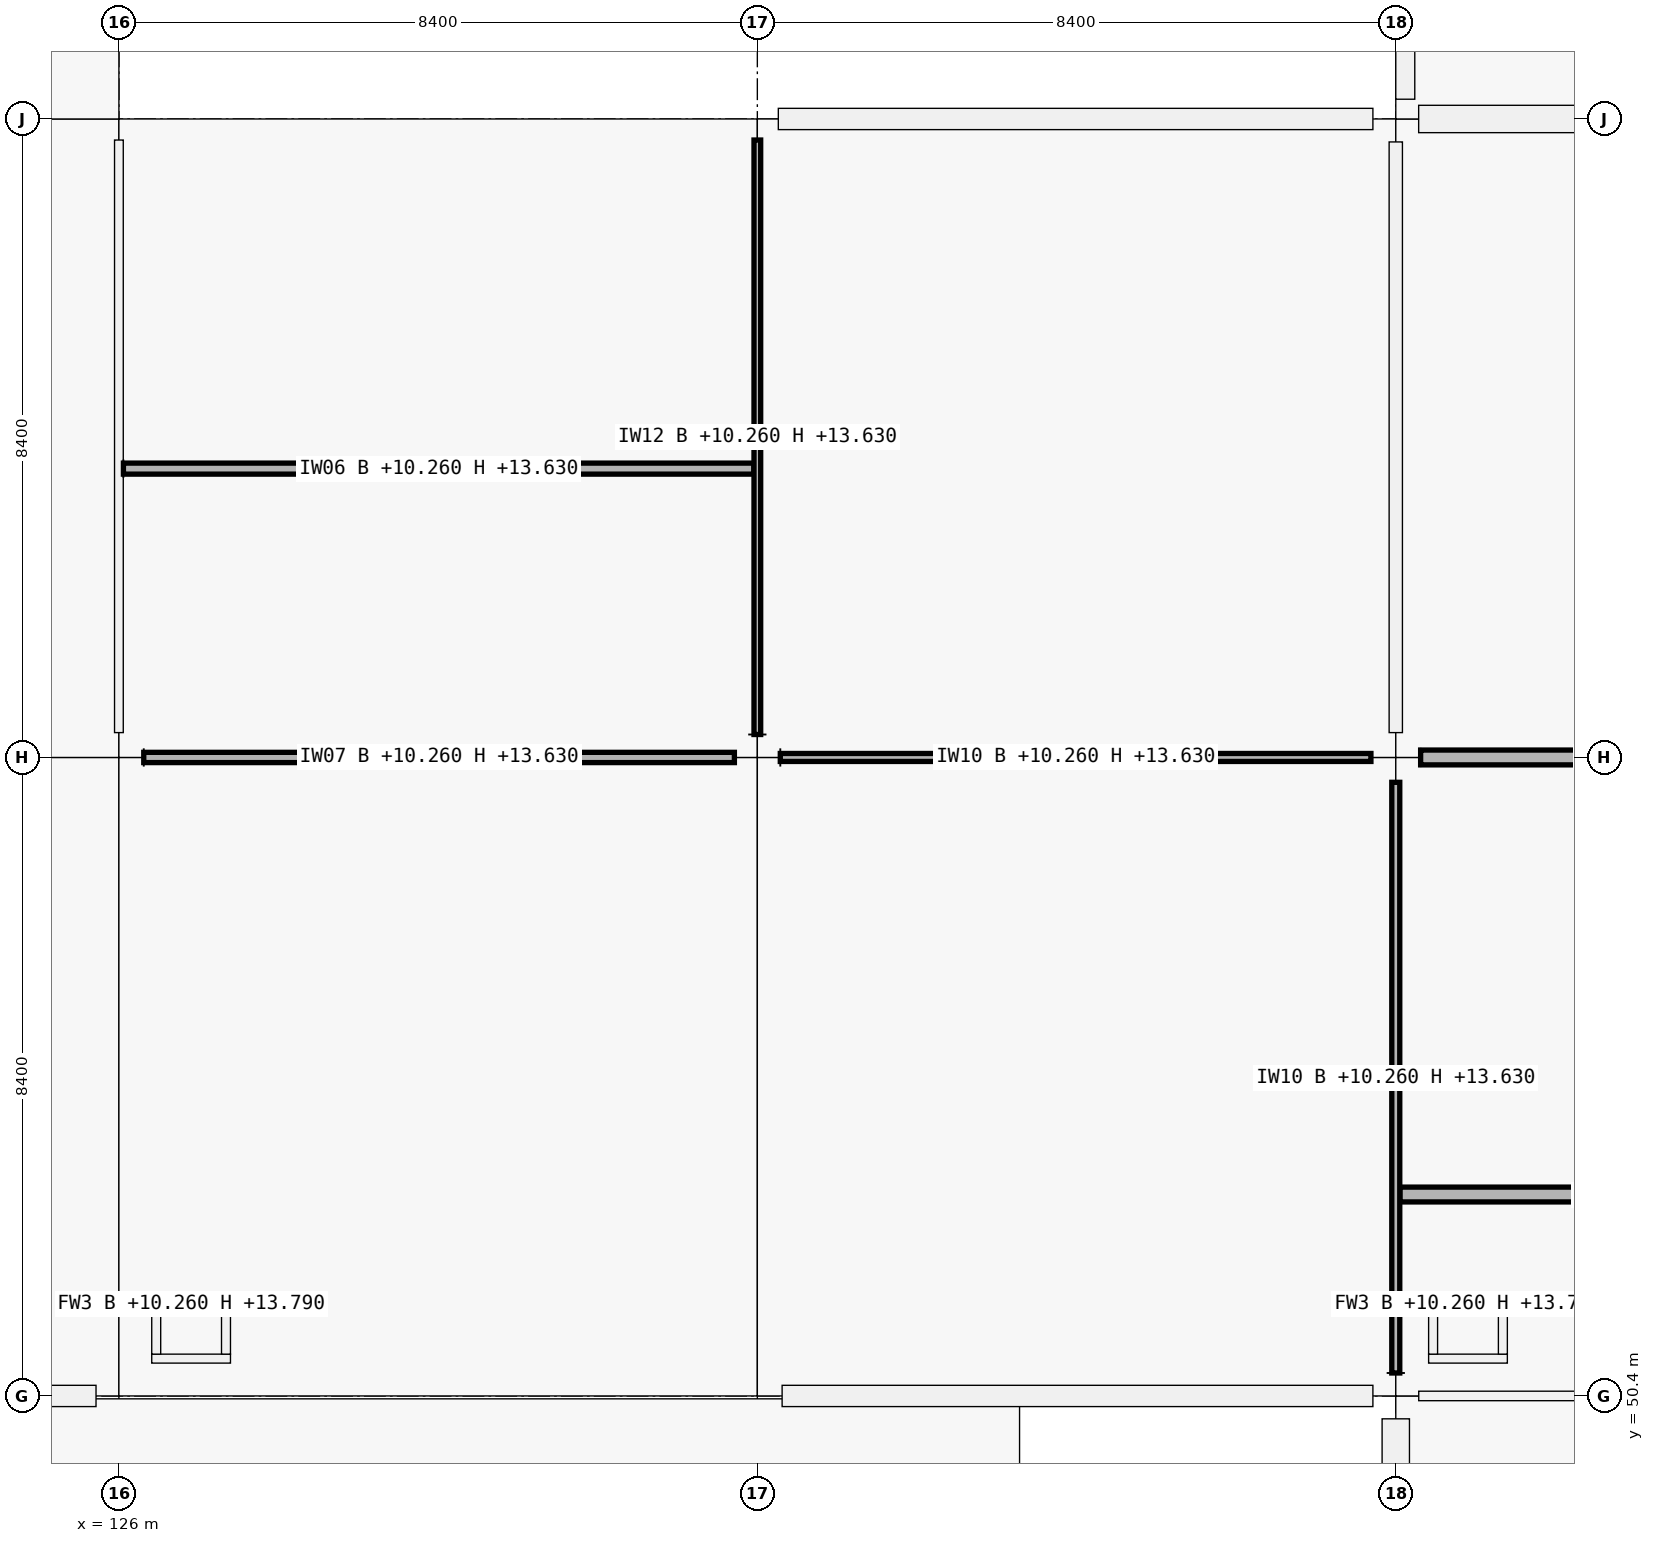
"""IFC4 building model, lengths in metres.
Left out: names, types, materials, properties, quantities, classifications, styles, units other than length and angle.
Written with IfcOpenShell. Run it as: python <this file> out.ifc"""

import sys

from ifc_helpers import new_model, si_unit, direction, frame, frame_2d, origin, origin_2d, place, context, subcontext, project, spatial, rectangle, extrude, element, fill, save


model = new_model("IFC4")
c1 = context("Model", 3, precision=1e-05, world=origin(), true_north=direction((0.0, 1.0)))
c2 = subcontext(c1, "Body", "Model", "MODEL_VIEW")
j1 = project(units=[si_unit("LENGTHUNIT", "METRE"), si_unit("PLANEANGLEUNIT", "RADIAN")], contexts=[c1])
p1 = place(None, origin())
s1 = spatial("IfcSite", under=j1, at=p1, CompositionType="ELEMENT")
p2 = place(p1, origin())
s2 = spatial("IfcBuilding", under=s1, at=p2, CompositionType="ELEMENT")
p3 = place(p2, frame((0.0, 0.0, 10.26)))
s3 = spatial("IfcBuildingStorey", under=s2, at=p3, CompositionType="ELEMENT", Elevation=10.26)
p4 = place(p3, frame((126.0, 50.4, 0.0), z_axis=(0.0, 0.0, 1.0), x_axis=(1.0, 0.0, 0.0)))
e1 = element("IfcColumn", 1, at=p4, inside=s3, PredefinedType="COLUMN", context=c2, shape_type="SweptSolid", body=[
    extrude(rectangle(XDim=0.6, YDim=0.6, at=origin_2d()), origin(), (0.0, 0.0, 1.0), 4.5),
])
p5 = place(p3, frame((126.0, 58.8, 0.0), z_axis=(0.0, 0.0, 1.0), x_axis=(1.0, 0.0, 0.0)))
e2 = element("IfcColumn", 2, at=p5, inside=s3, PredefinedType="COLUMN", context=c2, shape_type="SweptSolid", body=[
    extrude(rectangle(XDim=0.65, YDim=0.65, at=origin_2d()), origin(), (0.0, 0.0, 1.0), 4.5),
])
p6 = place(p3, frame((126.0, 67.2, 0.0), z_axis=(0.0, 0.0, 1.0), x_axis=(1.0, 0.0, 0.0)))
e3 = element("IfcColumn", 3, at=p6, inside=s3, PredefinedType="COLUMN", context=c2, shape_type="SweptSolid", body=[
    extrude(rectangle(XDim=0.55, YDim=0.55, at=origin_2d()), origin(), (0.0, 0.0, 1.0), 4.25),
])
p7 = place(p3, frame((134.4, 50.4, 0.0), z_axis=(0.0, 0.0, 1.0), x_axis=(1.0, 0.0, 0.0)))
e4 = element("IfcColumn", 4, at=p7, inside=s3, PredefinedType="COLUMN", context=c2, shape_type="SweptSolid", body=[
    extrude(rectangle(XDim=0.65, YDim=0.65, at=origin_2d()), origin(), (0.0, 0.0, 1.0), 4.5),
])
p8 = place(p3, frame((134.4, 58.8, 0.0), z_axis=(0.0, 0.0, 1.0), x_axis=(1.0, 0.0, 0.0)))
e5 = element("IfcColumn", 5, at=p8, inside=s3, PredefinedType="COLUMN", context=c2, shape_type="SweptSolid", body=[
    extrude(rectangle(XDim=0.6, YDim=0.6, at=origin_2d()), origin(), (0.0, 0.0, 1.0), 4.5),
])
p9 = place(p3, frame((134.4, 67.2, 0.0), z_axis=(0.0, 0.0, 1.0), x_axis=(1.0, 0.0, 0.0)))
e6 = element("IfcColumn", 6, at=p9, inside=s3, PredefinedType="COLUMN", context=c2, shape_type="SweptSolid", body=[
    extrude(rectangle(XDim=0.55, YDim=0.55, at=origin_2d()), origin(), (0.0, 0.0, 1.0), 4.25),
])
p10 = place(p3, frame((142.8, 50.4, 0.0), z_axis=(0.0, 0.0, 1.0), x_axis=(1.0, 0.0, 0.0)))
e7 = element("IfcColumn", 7, at=p10, inside=s3, PredefinedType="COLUMN", context=c2, shape_type="SweptSolid", body=[
    extrude(rectangle(XDim=0.6, YDim=0.6, at=origin_2d()), origin(), (0.0, 0.0, 1.0), 4.5),
])
p11 = place(p3, frame((142.8, 58.8, 0.0), z_axis=(0.0, 0.0, 1.0), x_axis=(1.0, 0.0, 0.0)))
e8 = element("IfcColumn", 8, at=p11, inside=s3, PredefinedType="COLUMN", context=c2, shape_type="SweptSolid", body=[
    extrude(rectangle(XDim=0.65, YDim=0.65, at=origin_2d()), origin(), (0.0, 0.0, 1.0), 4.5),
])
p12 = place(p3, frame((142.8, 67.2, 0.0), z_axis=(0.0, 0.0, 1.0), x_axis=(1.0, 0.0, 0.0)))
e9 = element("IfcColumn", 9, at=p12, inside=s3, PredefinedType="COLUMN", context=c2, shape_type="SweptSolid", body=[
    extrude(rectangle(XDim=0.6, YDim=0.6, at=origin_2d()), origin(), (0.0, 0.0, 1.0), 4.5),
])
p13 = place(p3, frame((125.699, 50.4, 0.0), z_axis=(0.0, 0.0, 1.0), x_axis=(-1.0, 0.0, 0.0)))
e10 = element("IfcWall", 10, at=p13, inside=s3, PredefinedType="SOLIDWALL", context=c2, shape_type="SweptSolid", body=[
    extrude(rectangle(XDim=7.773, YDim=0.28, at=frame_2d((3.886, 0.0))), origin(), (0.0, 0.0, 1.0), 3.54),
])
p14 = place(p13, frame((2.611, 0.0, 0.9)))
e11 = element("IfcOpeningElement", 11, at=p14, cuts=e10, PredefinedType="OPENING", context=c2, shape_type="SweptSolid", body=[
    extrude(rectangle(XDim=2.55, YDim=1.95, at=frame_2d((1.275, 0.975))), frame((0.0, 0.14, 0.0), z_axis=(0.0, -1.0, 0.0), x_axis=(1.0, 0.0, 0.0)), (0.0, 0.0, 1.0), 0.28),
])
p15 = place(p3, frame((142.499, 50.4, 0.0), z_axis=(0.0, 0.0, 1.0), x_axis=(-1.0, 0.0, 0.0)))
e12 = element("IfcWall", 12, at=p15, inside=s3, PredefinedType="SOLIDWALL", context=c2, shape_type="SweptSolid", body=[
    extrude(rectangle(XDim=7.773, YDim=0.28, at=frame_2d((3.886, 0.0))), origin(), (0.0, 0.0, 1.0), 3.54),
])
p16 = place(p15, frame((2.911, 0.0, 0.9)))
e13 = element("IfcOpeningElement", 13, at=p16, cuts=e12, PredefinedType="OPENING", context=c2, shape_type="SweptSolid", body=[
    extrude(rectangle(XDim=1.95, YDim=1.6, at=frame_2d((0.975, 0.8))), frame((0.0, 0.14, 0.0), z_axis=(0.0, -1.0, 0.0), x_axis=(1.0, 0.0, 0.0)), (0.0, 0.0, 1.0), 0.28),
])
p17 = place(p3, frame((134.676, 67.2, 0.0), z_axis=(0.0, 0.0, 1.0), x_axis=(1.0, 0.0, 0.0)))
e14 = element("IfcWall", 14, at=p17, inside=s3, PredefinedType="SOLIDWALL", context=c2, shape_type="SweptSolid", body=[
    extrude(rectangle(XDim=7.823, YDim=0.28, at=frame_2d((3.912, 0.0))), origin(), (0.0, 0.0, 1.0), 3.54),
])
p18 = place(p17, frame((2.737, 0.0, 0.9)))
e15 = element("IfcOpeningElement", 15, at=p18, cuts=e14, PredefinedType="OPENING", context=c2, shape_type="SweptSolid", body=[
    extrude(rectangle(XDim=2.35, YDim=1.6, at=frame_2d((1.175, 0.8))), frame((0.0, 0.14, 0.0), z_axis=(0.0, -1.0, 0.0), x_axis=(1.0, 0.0, 0.0)), (0.0, 0.0, 1.0), 0.28),
])
p19 = place(p3, frame((142.8, 42.326, 0.0), z_axis=(0.0, 0.0, 1.0), x_axis=(0.0, 1.0, 0.0)))
e16 = element("IfcWall", 16, at=p19, inside=s3, PredefinedType="SOLIDWALL", context=c2, shape_type="SweptSolid", body=[
    extrude(rectangle(XDim=7.773, YDim=0.36, at=frame_2d((3.887, 0.0))), origin(), (0.0, 0.0, 1.0), 3.54),
])
p20 = place(p19, frame((2.837, 0.0, 0.9)))
e17 = element("IfcOpeningElement", 17, at=p20, cuts=e16, PredefinedType="OPENING", context=c2, shape_type="SweptSolid", body=[
    extrude(rectangle(XDim=2.1, YDim=1.8, at=frame_2d((1.05, 0.9))), frame((0.0, 0.18, 0.0), z_axis=(0.0, -1.0, 0.0), x_axis=(1.0, 0.0, 0.0)), (0.0, 0.0, 1.0), 0.36),
])
p21 = place(p3, frame((143.101, 67.2, 0.0), z_axis=(0.0, 0.0, 1.0), x_axis=(1.0, 0.0, 0.0)))
e18 = element("IfcWall", 18, at=p21, inside=s3, PredefinedType="SOLIDWALL", context=c2, shape_type="SweptSolid", body=[
    extrude(rectangle(XDim=7.773, YDim=0.36, at=frame_2d((3.886, 0.0))), origin(), (0.0, 0.0, 1.0), 3.54),
])
p22 = place(p21, frame((2.686, 0.0, 0.9)))
e19 = element("IfcOpeningElement", 19, at=p22, cuts=e18, PredefinedType="OPENING", context=c2, shape_type="SweptSolid", body=[
    extrude(rectangle(XDim=2.4, YDim=1.8, at=frame_2d((1.2, 0.9))), frame((0.0, 0.18, 0.0), z_axis=(0.0, -1.0, 0.0), x_axis=(1.0, 0.0, 0.0)), (0.0, 0.0, 1.0), 0.36),
])
p23 = place(p3, frame((142.925, 67.46, 0.0), z_axis=(0.0, 0.0, 1.0), x_axis=(0.0, 1.0, 0.0)))
e20 = element("IfcWall", 20, at=p23, inside=s3, PredefinedType="PARAPET", context=c2, shape_type="SweptSolid", body=[
    extrude(rectangle(XDim=7.88, YDim=0.25, at=frame_2d((3.94, 0.0))), origin(), (0.0, 0.0, 1.0), 0.95),
])
for number, where, z_axis, x_axis in (
    (21, (126.432, 50.891, 0.0), (0.0, 0.0, 1.0), (1.0, 0.0, 0.0)),
    (22, (126.432, 51.609, 0.0), (0.0, 0.0, 1.0), (1.0, 0.0, 0.0)),
):
    element("IfcWall", number, at=place(p3, frame(where, z_axis=z_axis, x_axis=x_axis)), inside=s3, PredefinedType="PARTITIONING", context=c2, shape_type="SweptSolid", body=[
        extrude(rectangle(XDim=1.036, YDim=0.118, at=frame_2d((0.518, 0.0))), origin(), (0.0, 0.0, 1.0), 3.53),
    ])
for number, where, z_axis, x_axis in (
    (23, (126.491, 50.95, 0.0), (0.0, 0.0, 1.0), (0.0, 1.0, 0.0)),
    (24, (127.409, 50.95, 0.0), (0.0, 0.0, 1.0), (0.0, 1.0, 0.0)),
):
    element("IfcWall", number, at=place(p3, frame(where, z_axis=z_axis, x_axis=x_axis)), inside=s3, PredefinedType="PARTITIONING", context=c2, shape_type="SweptSolid", body=[
        extrude(rectangle(XDim=0.6, YDim=0.118, at=frame_2d((0.3, 0.0))), origin(), (0.0, 0.0, 1.0), 3.53),
    ])
for number, where, z_axis, x_axis in (
    (25, (143.232, 50.891, 0.0), (0.0, 0.0, 1.0), (1.0, 0.0, 0.0)),
    (26, (143.232, 51.609, 0.0), (0.0, 0.0, 1.0), (1.0, 0.0, 0.0)),
):
    element("IfcWall", number, at=place(p3, frame(where, z_axis=z_axis, x_axis=x_axis)), inside=s3, PredefinedType="PARTITIONING", context=c2, shape_type="SweptSolid", body=[
        extrude(rectangle(XDim=1.036, YDim=0.118, at=frame_2d((0.518, 0.0))), origin(), (0.0, 0.0, 1.0), 3.53),
    ])
for number, where, z_axis, x_axis in (
    (27, (143.291, 50.95, 0.0), (0.0, 0.0, 1.0), (0.0, 1.0, 0.0)),
    (28, (144.209, 50.95, 0.0), (0.0, 0.0, 1.0), (0.0, 1.0, 0.0)),
):
    element("IfcWall", number, at=place(p3, frame(where, z_axis=z_axis, x_axis=x_axis)), inside=s3, PredefinedType="PARTITIONING", context=c2, shape_type="SweptSolid", body=[
        extrude(rectangle(XDim=0.6, YDim=0.118, at=frame_2d((0.3, 0.0))), origin(), (0.0, 0.0, 1.0), 3.53),
    ])
p24 = place(p3, frame((126.327, 58.8, 0.0), z_axis=(0.0, 0.0, 1.0), x_axis=(1.0, 0.0, 0.0)))
e29 = element("IfcWall", 29, at=p24, inside=s3, PredefinedType="PARTITIONING", context=c2, shape_type="SweptSolid", body=[
    extrude(rectangle(XDim=7.771, YDim=0.135, at=frame_2d((3.885, 0.0))), origin(), (0.0, 0.0, 1.0), 3.37),
])
p25 = place(p3, frame((134.702, 58.8, 0.0), z_axis=(0.0, 0.0, 1.0), x_axis=(1.0, 0.0, 0.0)))
e30 = element("IfcWall", 30, at=p25, inside=s3, PredefinedType="PARTITIONING", context=c2, shape_type="SweptSolid", body=[
    extrude(rectangle(XDim=7.771, YDim=0.105, at=frame_2d((3.885, 0.0))), origin(), (0.0, 0.0, 1.0), 3.37),
])
p26 = place(p25, frame((3.415, 0.0, 0.0)))
e31 = element("IfcOpeningElement", 31, at=p26, cuts=e30, PredefinedType="OPENING", context=c2, shape_type="SweptSolid", body=[
    extrude(rectangle(XDim=0.94, YDim=2.15, at=frame_2d((0.47, 1.075))), frame((0.0, 0.052, 0.0), z_axis=(0.0, -1.0, 0.0), x_axis=(1.0, 0.0, 0.0)), (0.0, 0.0, 1.0), 0.105),
])
p27 = place(p3, frame((143.102, 50.4, 0.0), z_axis=(0.0, 0.0, 1.0), x_axis=(1.0, 0.0, 0.0)))
e32 = element("IfcWall", 32, at=p27, inside=s3, PredefinedType="PARTITIONING", context=c2, shape_type="SweptSolid", body=[
    extrude(rectangle(XDim=7.771, YDim=0.125, at=frame_2d((3.885, 0.0))), origin(), (0.0, 0.0, 1.0), 3.37),
])
p28 = place(p3, frame((143.127, 58.8, 0.0), z_axis=(0.0, 0.0, 1.0), x_axis=(1.0, 0.0, 0.0)))
e33 = element("IfcWall", 33, at=p28, inside=s3, PredefinedType="PARTITIONING", context=c2, shape_type="SweptSolid", body=[
    extrude(rectangle(XDim=7.771, YDim=0.195, at=frame_2d((3.885, 0.0))), origin(), (0.0, 0.0, 1.0), 3.37),
])
p29 = place(p3, frame((126.0, 59.127, 0.0), z_axis=(0.0, 0.0, 1.0), x_axis=(0.0, 1.0, 0.0)))
e34 = element("IfcWall", 34, at=p29, inside=s3, PredefinedType="PARTITIONING", context=c2, shape_type="SweptSolid", body=[
    extrude(rectangle(XDim=7.796, YDim=0.115, at=frame_2d((3.898, 0.0))), origin(), (0.0, 0.0, 1.0), 3.37),
])
p30 = place(p29, frame((1.253, 0.0, 0.0)))
e35 = element("IfcOpeningElement", 35, at=p30, cuts=e34, PredefinedType="OPENING", context=c2, shape_type="SweptSolid", body=[
    extrude(rectangle(XDim=0.92, YDim=2.15, at=frame_2d((0.46, 1.075))), frame((0.0, 0.058, 0.0), z_axis=(0.0, -1.0, 0.0), x_axis=(1.0, 0.0, 0.0)), (0.0, 0.0, 1.0), 0.115),
])
p31 = place(p29, frame((5.108, 0.0, 0.0)))
e36 = element("IfcOpeningElement", 36, at=p31, cuts=e34, PredefinedType="OPENING", context=c2, shape_type="SweptSolid", body=[
    extrude(rectangle(XDim=1.05, YDim=2.12, at=frame_2d((0.525, 1.06))), frame((0.0, 0.058, 0.0), z_axis=(0.0, -1.0, 0.0), x_axis=(1.0, 0.0, 0.0)), (0.0, 0.0, 1.0), 0.115),
])
p32 = place(p3, frame((134.4, 59.102, 0.0), z_axis=(0.0, 0.0, 1.0), x_axis=(0.0, 1.0, 0.0)))
e37 = element("IfcWall", 37, at=p32, inside=s3, PredefinedType="PARTITIONING", context=c2, shape_type="SweptSolid", body=[
    extrude(rectangle(XDim=7.821, YDim=0.088, at=frame_2d((3.911, 0.0))), origin(), (0.0, 0.0, 1.0), 3.37),
])
p33 = place(p3, frame((142.8, 50.702, 0.0), z_axis=(0.0, 0.0, 1.0), x_axis=(0.0, 1.0, 0.0)))
e38 = element("IfcWall", 38, at=p33, inside=s3, PredefinedType="PARTITIONING", context=c2, shape_type="SweptSolid", body=[
    extrude(rectangle(XDim=7.771, YDim=0.105, at=frame_2d((3.885, 0.0))), origin(), (0.0, 0.0, 1.0), 3.37),
])
p34 = place(p33, frame((0.673, 0.0, 0.0)))
e39 = element("IfcOpeningElement", 39, at=p34, cuts=e38, PredefinedType="OPENING", context=c2, shape_type="SweptSolid", body=[
    extrude(rectangle(XDim=0.98, YDim=2.08, at=frame_2d((0.49, 1.04))), frame((0.0, 0.052, 0.0), z_axis=(0.0, -1.0, 0.0), x_axis=(1.0, 0.0, 0.0)), (0.0, 0.0, 1.0), 0.105),
])
p35 = place(p33, frame((4.613, 0.0, 0.0)))
e40 = element("IfcOpeningElement", 40, at=p35, cuts=e38, PredefinedType="OPENING", context=c2, shape_type="SweptSolid", body=[
    extrude(rectangle(XDim=0.94, YDim=2.08, at=frame_2d((0.47, 1.04))), frame((0.0, 0.052, 0.0), z_axis=(0.0, -1.0, 0.0), x_axis=(1.0, 0.0, 0.0)), (0.0, 0.0, 1.0), 0.105),
])
p36 = place(p3, frame((142.8, 59.127, 0.0), z_axis=(0.0, 0.0, 1.0), x_axis=(0.0, 1.0, 0.0)))
e41 = element("IfcWall", 41, at=p36, inside=s3, PredefinedType="PARTITIONING", context=c2, shape_type="SweptSolid", body=[
    extrude(rectangle(XDim=7.771, YDim=0.175, at=frame_2d((3.885, 0.0))), origin(), (0.0, 0.0, 1.0), 3.37),
])
p37 = place(p36, frame((3.345, 0.0, 0.0)))
e42 = element("IfcOpeningElement", 42, at=p37, cuts=e41, PredefinedType="OPENING", context=c2, shape_type="SweptSolid", body=[
    extrude(rectangle(XDim=1.08, YDim=2.25, at=frame_2d((0.54, 1.125))), frame((0.0, 0.087, 0.0), z_axis=(0.0, -1.0, 0.0), x_axis=(1.0, 0.0, 0.0)), (0.0, 0.0, 1.0), 0.175),
])
p38 = place(p3, frame((126.06, 62.6, 0.0), z_axis=(0.0, 0.0, 1.0), x_axis=(1.0, 0.0, 0.0)))
e43 = element("IfcWall", 43, at=p38, inside=s3, PredefinedType="PARTITIONING", context=c2, shape_type="SweptSolid", body=[
    extrude(rectangle(XDim=8.294, YDim=0.145, at=frame_2d((4.147, 0.0))), origin(), (0.0, 0.0, 1.0), 3.37),
])
p39 = place(p3, frame((142.854, 53.05, 0.0), z_axis=(0.0, 0.0, 1.0), x_axis=(1.0, 0.0, 0.0)))
e44 = element("IfcWall", 44, at=p39, inside=s3, PredefinedType="PARTITIONING", context=c2, shape_type="SweptSolid", body=[
    extrude(rectangle(XDim=8.246, YDim=0.195, at=frame_2d((4.123, 0.0))), origin(), (0.0, 0.0, 1.0), 3.37),
])
p40 = place(p16, origin())
e45 = element("IfcWindow", 45, at=p40, inside=s3, PartitioningType="SINGLE_PANEL", PredefinedType="WINDOW", context=c2, shape_type="SweptSolid", body=[
    extrude(rectangle(XDim=1.95, YDim=1.6, at=frame_2d((0.975, 0.8))), frame((0.0, 0.03, 0.0), z_axis=(0.0, -1.0, 0.0), x_axis=(1.0, 0.0, 0.0)), (0.0, 0.0, 1.0), 0.06),
])
fill(e13, e45)
p41 = place(p18, origin())
e46 = element("IfcWindow", 46, at=p41, inside=s3, PartitioningType="SINGLE_PANEL", PredefinedType="WINDOW", context=c2, shape_type="SweptSolid", body=[
    extrude(rectangle(XDim=2.35, YDim=1.6, at=frame_2d((1.175, 0.8))), frame((0.0, 0.03, 0.0), z_axis=(0.0, -1.0, 0.0), x_axis=(1.0, 0.0, 0.0)), (0.0, 0.0, 1.0), 0.06),
])
fill(e15, e46)
p42 = place(p30, origin())
e47 = element("IfcDoor", 47, at=p42, inside=s3, OperationType="SINGLE_SWING_RIGHT", PredefinedType="DOOR", context=c2, shape_type="SweptSolid", body=[
    extrude(rectangle(XDim=0.92, YDim=2.15, at=frame_2d((0.46, 1.075))), frame((0.0, 0.025, 0.0), z_axis=(0.0, -1.0, 0.0), x_axis=(1.0, 0.0, 0.0)), (0.0, 0.0, 1.0), 0.05),
])
fill(e35, e47)
p43 = place(p31, origin())
e48 = element("IfcDoor", 48, at=p43, inside=s3, OperationType="SINGLE_SWING_LEFT", PredefinedType="DOOR", context=c2, shape_type="SweptSolid", body=[
    extrude(rectangle(XDim=1.05, YDim=2.12, at=frame_2d((0.525, 1.06))), frame((0.0, 0.025, 0.0), z_axis=(0.0, -1.0, 0.0), x_axis=(1.0, 0.0, 0.0)), (0.0, 0.0, 1.0), 0.05),
])
fill(e36, e48)
p44 = place(p34, origin())
e49 = element("IfcDoor", 49, at=p44, inside=s3, OperationType="SINGLE_SWING_RIGHT", PredefinedType="DOOR", context=c2, shape_type="SweptSolid", body=[
    extrude(rectangle(XDim=0.98, YDim=2.08, at=frame_2d((0.49, 1.04))), frame((0.0, 0.025, 0.0), z_axis=(0.0, -1.0, 0.0), x_axis=(1.0, 0.0, 0.0)), (0.0, 0.0, 1.0), 0.05),
])
fill(e39, e49)
p45 = place(p35, origin())
e50 = element("IfcDoor", 50, at=p45, inside=s3, OperationType="SINGLE_SWING_LEFT", PredefinedType="DOOR", context=c2, shape_type="SweptSolid", body=[
    extrude(rectangle(XDim=0.94, YDim=2.08, at=frame_2d((0.47, 1.04))), frame((0.0, 0.025, 0.0), z_axis=(0.0, -1.0, 0.0), x_axis=(1.0, 0.0, 0.0)), (0.0, 0.0, 1.0), 0.05),
])
fill(e40, e50)
p46 = place(p26, origin())
e51 = element("IfcDoor", 51, at=p46, inside=s3, OperationType="SINGLE_SWING_LEFT", PredefinedType="DOOR", context=c2, shape_type="SweptSolid", body=[
    extrude(rectangle(XDim=0.94, YDim=2.15, at=frame_2d((0.47, 1.075))), frame((0.0, 0.025, 0.0), z_axis=(0.0, -1.0, 0.0), x_axis=(1.0, 0.0, 0.0)), (0.0, 0.0, 1.0), 0.05),
])
fill(e31, e51)
p47 = place(p37, origin())
e52 = element("IfcDoor", 52, at=p47, inside=s3, OperationType="SINGLE_SWING_LEFT", PredefinedType="DOOR", context=c2, shape_type="SweptSolid", body=[
    extrude(rectangle(XDim=1.08, YDim=2.25, at=frame_2d((0.54, 1.125))), frame((0.0, 0.025, 0.0), z_axis=(0.0, -1.0, 0.0), x_axis=(1.0, 0.0, 0.0)), (0.0, 0.0, 1.0), 0.05),
])
fill(e42, e52)
save(model, sys.argv[1])
